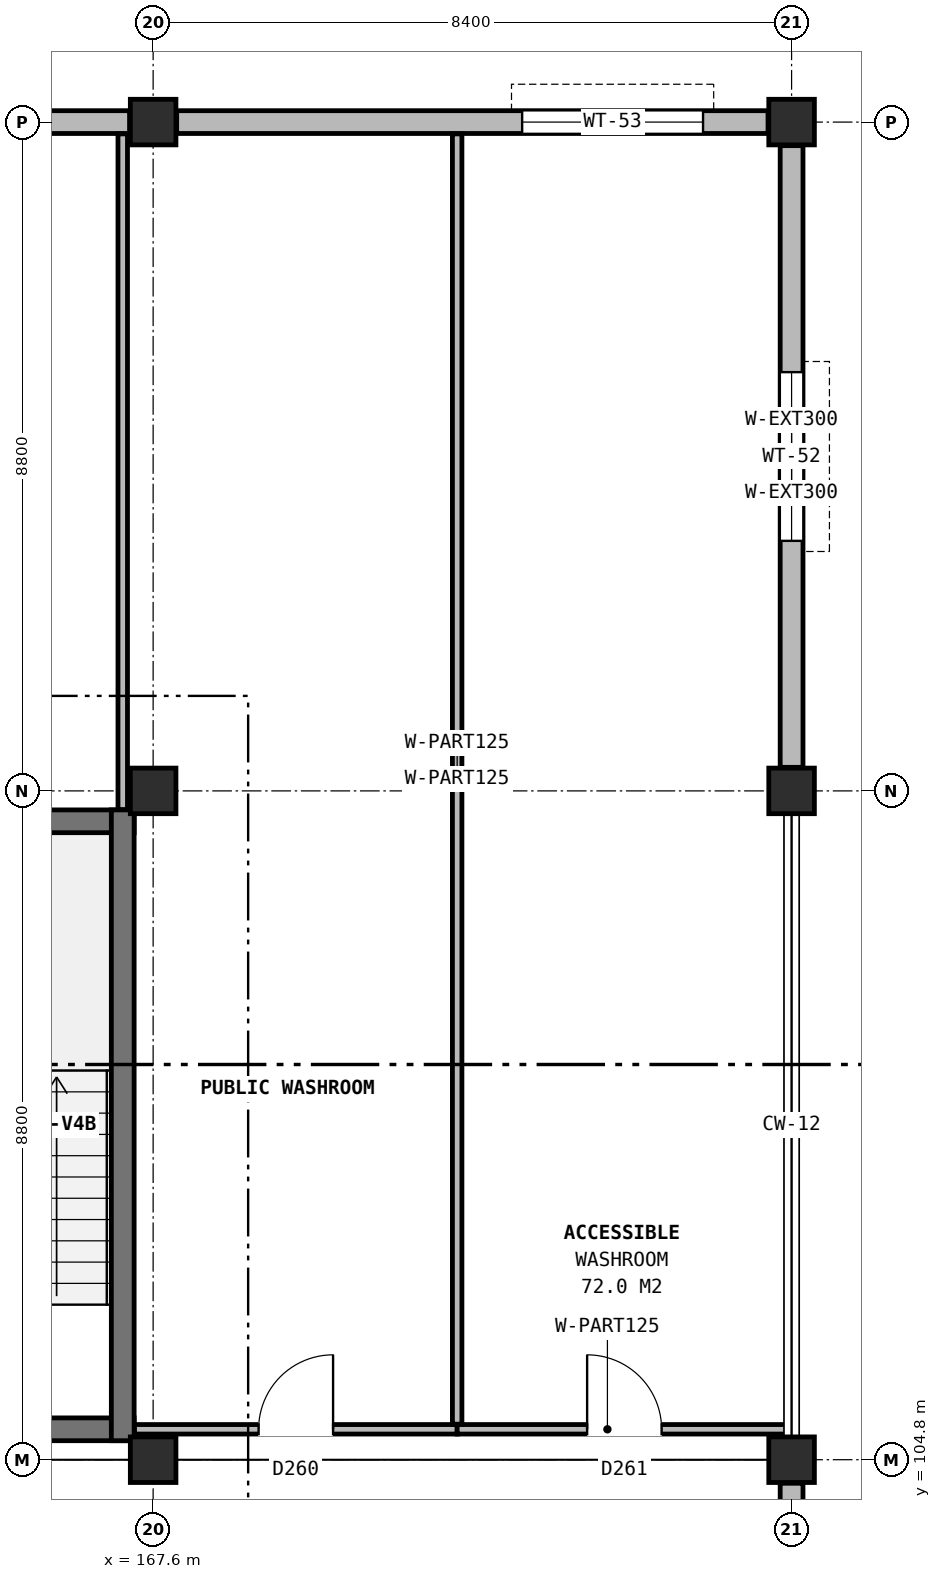
"""IFC4 building model, lengths in metres.
Left out: names, types, materials, properties, quantities, classifications, styles, units other than length and angle.
Written with IfcOpenShell. Run it as: python <this file> out.ifc"""

import sys

from ifc_helpers import new_model, si_unit, direction, frame, frame_2d, origin, origin_2d, place, context, subcontext, project, spatial, rectangle, extrude, element, fill, save


model = new_model("IFC4")
c1 = context("Model", 3, precision=1e-05, world=origin(), true_north=direction((0.0, 1.0)))
c2 = subcontext(c1, "Body", "Model", "MODEL_VIEW")
j1 = project(units=[si_unit("LENGTHUNIT", "METRE"), si_unit("PLANEANGLEUNIT", "RADIAN")], contexts=[c1])
p1 = place(None, origin())
s1 = spatial("IfcSite", under=j1, at=p1, CompositionType="ELEMENT")
p2 = place(p1, origin())
s2 = spatial("IfcBuilding", under=s1, at=p2, CompositionType="ELEMENT")
p3 = place(p2, frame((0.0, 0.0, 48.2)))
s3 = spatial("IfcBuildingStorey", under=s2, at=p3, CompositionType="ELEMENT", Elevation=48.2)
for number, where, z_axis, x_axis in (
    (1, (167.6, 104.8, 0.0), (0.0, 0.0, 1.0), (1.0, 0.0, 0.0)),
    (2, (167.6, 113.6, 0.0), (0.0, 0.0, 1.0), (1.0, 0.0, 0.0)),
    (3, (167.6, 122.4, 0.0), (0.0, 0.0, 1.0), (1.0, 0.0, 0.0)),
    (4, (176.0, 104.8, 0.0), (0.0, 0.0, 1.0), (1.0, 0.0, 0.0)),
    (5, (176.0, 113.6, 0.0), (0.0, 0.0, 1.0), (1.0, 0.0, 0.0)),
    (6, (176.0, 122.4, 0.0), (0.0, 0.0, 1.0), (1.0, 0.0, 0.0)),
):
    element("IfcColumn", number, at=place(p3, frame(where, z_axis=z_axis, x_axis=x_axis)), inside=s3, PredefinedType="COLUMN", context=c2, shape_type="SweptSolid", body=[
        extrude(rectangle(XDim=0.6, YDim=0.6, at=origin_2d()), origin(), (0.0, 0.0, 1.0), 4.0),
    ])
p4 = place(p3, frame((176.0, 96.31, 0.0), z_axis=(0.0, 0.0, 1.0), x_axis=(0.0, 1.0, 0.0)))
e7 = element("IfcWall", 7, at=p4, inside=s3, PredefinedType="SOLIDWALL", context=c2, shape_type="SweptSolid", body=[
    extrude(rectangle(XDim=8.18, YDim=0.3, at=frame_2d((4.09, 0.0))), origin(), (0.0, 0.0, 1.0), 3.25),
])
p5 = place(p4, frame((2.005, 0.0, 0.9)))
e8 = element("IfcOpeningElement", 8, at=p5, cuts=e7, PredefinedType="OPENING", context=c2, shape_type="SweptSolid", body=[
    extrude(rectangle(XDim=2.08, YDim=2.04, at=frame_2d((1.04, 1.02))), frame((0.0, 0.16, 0.0), z_axis=(0.0, -1.0, 0.0), x_axis=(1.0, 0.0, 0.0)), (0.0, 0.0, 1.0), 0.32),
])
p6 = place(p3, frame((176.0, 113.91, 0.0), z_axis=(0.0, 0.0, 1.0), x_axis=(0.0, 1.0, 0.0)))
e9 = element("IfcWall", 9, at=p6, inside=s3, PredefinedType="SOLIDWALL", context=c2, shape_type="SweptSolid", body=[
    extrude(rectangle(XDim=8.18, YDim=0.3, at=frame_2d((4.09, 0.0))), origin(), (0.0, 0.0, 1.0), 3.25),
])
p7 = place(p6, frame((2.98, 0.0, 0.9)))
e10 = element("IfcOpeningElement", 10, at=p7, cuts=e9, PredefinedType="OPENING", context=c2, shape_type="SweptSolid", body=[
    extrude(rectangle(XDim=2.22, YDim=2.08, at=frame_2d((1.11, 1.04))), frame((0.0, 0.16, 0.0), z_axis=(0.0, -1.0, 0.0), x_axis=(1.0, 0.0, 0.0)), (0.0, 0.0, 1.0), 0.32),
])
p8 = place(p3, frame((175.69, 122.4, 0.0), z_axis=(0.0, 0.0, 1.0), x_axis=(-1.0, 0.0, 0.0)))
e11 = element("IfcWall", 11, at=p8, inside=s3, PredefinedType="SOLIDWALL", context=c2, shape_type="SweptSolid", body=[
    extrude(rectangle(XDim=7.78, YDim=0.3, at=frame_2d((3.89, 0.0))), origin(), (0.0, 0.0, 1.0), 3.25),
])
p9 = place(p8, frame((0.855, 0.0, 0.9)))
e12 = element("IfcOpeningElement", 12, at=p9, cuts=e11, PredefinedType="OPENING", context=c2, shape_type="SweptSolid", body=[
    extrude(rectangle(XDim=2.38, YDim=2.12, at=frame_2d((1.19, 1.06))), frame((0.0, 0.16, 0.0), z_axis=(0.0, -1.0, 0.0), x_axis=(1.0, 0.0, 0.0)), (0.0, 0.0, 1.0), 0.32),
])
p10 = place(p3, frame((167.29, 122.4, 0.0), z_axis=(0.0, 0.0, 1.0), x_axis=(-1.0, 0.0, 0.0)))
e13 = element("IfcWall", 13, at=p10, inside=s3, PredefinedType="SOLIDWALL", context=c2, shape_type="SweptSolid", body=[
    extrude(rectangle(XDim=7.78, YDim=0.3, at=frame_2d((3.89, 0.0))), origin(), (0.0, 0.0, 1.0), 3.25),
])
p11 = place(p10, frame((2.665, 0.0, 0.9)))
e14 = element("IfcOpeningElement", 14, at=p11, cuts=e13, PredefinedType="OPENING", context=c2, shape_type="SweptSolid", body=[
    extrude(rectangle(XDim=2.54, YDim=2.16, at=frame_2d((1.27, 1.08))), frame((0.0, 0.16, 0.0), z_axis=(0.0, -1.0, 0.0), x_axis=(1.0, 0.0, 0.0)), (0.0, 0.0, 1.0), 0.32),
])
p12 = place(p3, frame((163.75, 105.2, 0.0), z_axis=(0.0, 0.0, 1.0), x_axis=(1.0, 0.0, 0.0)))
e15 = element("IfcWall", 15, at=p12, inside=s3, PredefinedType="SHEAR", context=c2, shape_type="SweptSolid", body=[
    extrude(rectangle(XDim=3.6, YDim=0.3, at=frame_2d((1.8, 0.0))), origin(), (0.0, 0.0, 1.0), 4.0),
])
p13 = place(p12, frame((1.05, 0.0, 0.0)))
e16 = element("IfcOpeningElement", 16, at=p13, cuts=e15, PredefinedType="OPENING", context=c2, shape_type="SweptSolid", body=[
    extrude(rectangle(XDim=1.1, YDim=2.2, at=frame_2d((0.55, 1.1))), frame((0.0, 0.16, 0.0), z_axis=(0.0, -1.0, 0.0), x_axis=(1.0, 0.0, 0.0)), (0.0, 0.0, 1.0), 0.32),
])
p14 = place(p3, frame((163.75, 113.2, 0.0), z_axis=(0.0, 0.0, 1.0), x_axis=(1.0, 0.0, 0.0)))
e17 = element("IfcWall", 17, at=p14, inside=s3, PredefinedType="SHEAR", context=c2, shape_type="SweptSolid", body=[
    extrude(rectangle(XDim=3.6, YDim=0.3, at=frame_2d((1.8, 0.0))), origin(), (0.0, 0.0, 1.0), 4.0),
])
p15 = place(p3, frame((167.2, 105.05, 0.0), z_axis=(0.0, 0.0, 1.0), x_axis=(0.0, 1.0, 0.0)))
e18 = element("IfcWall", 18, at=p15, inside=s3, PredefinedType="SHEAR", context=c2, shape_type="SweptSolid", body=[
    extrude(rectangle(XDim=8.3, YDim=0.3, at=frame_2d((4.15, 0.0))), origin(), (0.0, 0.0, 1.0), 4.0),
])
p16 = place(p3, frame((167.355, 105.2, 0.0), z_axis=(0.0, 0.0, 1.0), x_axis=(1.0, 0.0, 0.0)))
e19 = element("IfcWall", 19, at=p16, inside=s3, PredefinedType="PARTITIONING", context=c2, shape_type="SweptSolid", body=[
    extrude(rectangle(XDim=4.245, YDim=0.125, at=frame_2d((2.123, 0.0))), origin(), (0.0, 0.0, 1.0), 3.245),
])
p17 = place(p16, frame((1.633, 0.0, 0.0)))
e20 = element("IfcOpeningElement", 20, at=p17, cuts=e19, PredefinedType="OPENING", context=c2, shape_type="SweptSolid", body=[
    extrude(rectangle(XDim=0.98, YDim=2.1, at=frame_2d((0.49, 1.05))), frame((0.0, 0.073, 0.0), z_axis=(0.0, -1.0, 0.0), x_axis=(1.0, 0.0, 0.0)), (0.0, 0.0, 1.0), 0.145),
])
p18 = place(p3, frame((171.6, 105.2, 0.0), z_axis=(0.0, 0.0, 1.0), x_axis=(1.0, 0.0, 0.0)))
e21 = element("IfcWall", 21, at=p18, inside=s3, PredefinedType="PARTITIONING", context=c2, shape_type="SweptSolid", body=[
    extrude(rectangle(XDim=4.4, YDim=0.125, at=frame_2d((2.2, 0.0))), origin(), (0.0, 0.0, 1.0), 3.245),
])
p19 = place(p18, frame((1.71, 0.0, 0.0)))
e22 = element("IfcOpeningElement", 22, at=p19, cuts=e21, PredefinedType="OPENING", context=c2, shape_type="SweptSolid", body=[
    extrude(rectangle(XDim=0.98, YDim=2.1, at=frame_2d((0.49, 1.05))), frame((0.0, 0.073, 0.0), z_axis=(0.0, -1.0, 0.0), x_axis=(1.0, 0.0, 0.0)), (0.0, 0.0, 1.0), 0.145),
])
p20 = place(p3, frame((167.2, 113.355, 0.0), z_axis=(0.0, 0.0, 1.0), x_axis=(0.0, 1.0, 0.0)))
e23 = element("IfcWall", 23, at=p20, inside=s3, PredefinedType="PARTITIONING", context=c2, shape_type="SweptSolid", body=[
    extrude(rectangle(XDim=8.89, YDim=0.125, at=frame_2d((4.445, 0.0))), origin(), (0.0, 0.0, 1.0), 3.245),
])
p21 = place(p3, frame((171.6, 105.268, 0.0), z_axis=(0.0, 0.0, 1.0), x_axis=(0.0, 1.0, 0.0)))
e24 = element("IfcWall", 24, at=p21, inside=s3, PredefinedType="PARTITIONING", context=c2, shape_type="SweptSolid", body=[
    extrude(rectangle(XDim=16.978, YDim=0.125, at=frame_2d((8.489, 0.0))), origin(), (0.0, 0.0, 1.0), 3.665),
])
p22 = place(p7, origin())
e25 = element("IfcWindow", 25, at=p22, inside=s3, PartitioningType="SINGLE_PANEL", PredefinedType="WINDOW", context=c2, shape_type="SweptSolid", body=[
    extrude(rectangle(XDim=2.22, YDim=2.08, at=frame_2d((1.11, 1.04))), frame((0.0, 0.03, 0.0), z_axis=(0.0, -1.0, 0.0), x_axis=(1.0, 0.0, 0.0)), (0.0, 0.0, 1.0), 0.06),
])
fill(e10, e25)
p23 = place(p9, origin())
e26 = element("IfcWindow", 26, at=p23, inside=s3, PartitioningType="SINGLE_PANEL", PredefinedType="WINDOW", context=c2, shape_type="SweptSolid", body=[
    extrude(rectangle(XDim=2.38, YDim=2.12, at=frame_2d((1.19, 1.06))), frame((0.0, 0.03, 0.0), z_axis=(0.0, -1.0, 0.0), x_axis=(1.0, 0.0, 0.0)), (0.0, 0.0, 1.0), 0.06),
])
fill(e12, e26)
p24 = place(p17, origin())
e27 = element("IfcDoor", 27, at=p24, inside=s3, OperationType="SINGLE_SWING_RIGHT", PredefinedType="DOOR", context=c2, shape_type="SweptSolid", body=[
    extrude(rectangle(XDim=0.98, YDim=2.1, at=frame_2d((0.49, 1.05))), frame((0.0, 0.025, 0.0), z_axis=(0.0, -1.0, 0.0), x_axis=(1.0, 0.0, 0.0)), (0.0, 0.0, 1.0), 0.05),
])
fill(e20, e27)
p25 = place(p19, origin())
e28 = element("IfcDoor", 28, at=p25, inside=s3, OperationType="SINGLE_SWING_LEFT", PredefinedType="DOOR", context=c2, shape_type="SweptSolid", body=[
    extrude(rectangle(XDim=0.98, YDim=2.1, at=frame_2d((0.49, 1.05))), frame((0.0, 0.025, 0.0), z_axis=(0.0, -1.0, 0.0), x_axis=(1.0, 0.0, 0.0)), (0.0, 0.0, 1.0), 0.05),
])
fill(e22, e28)
save(model, sys.argv[1])
